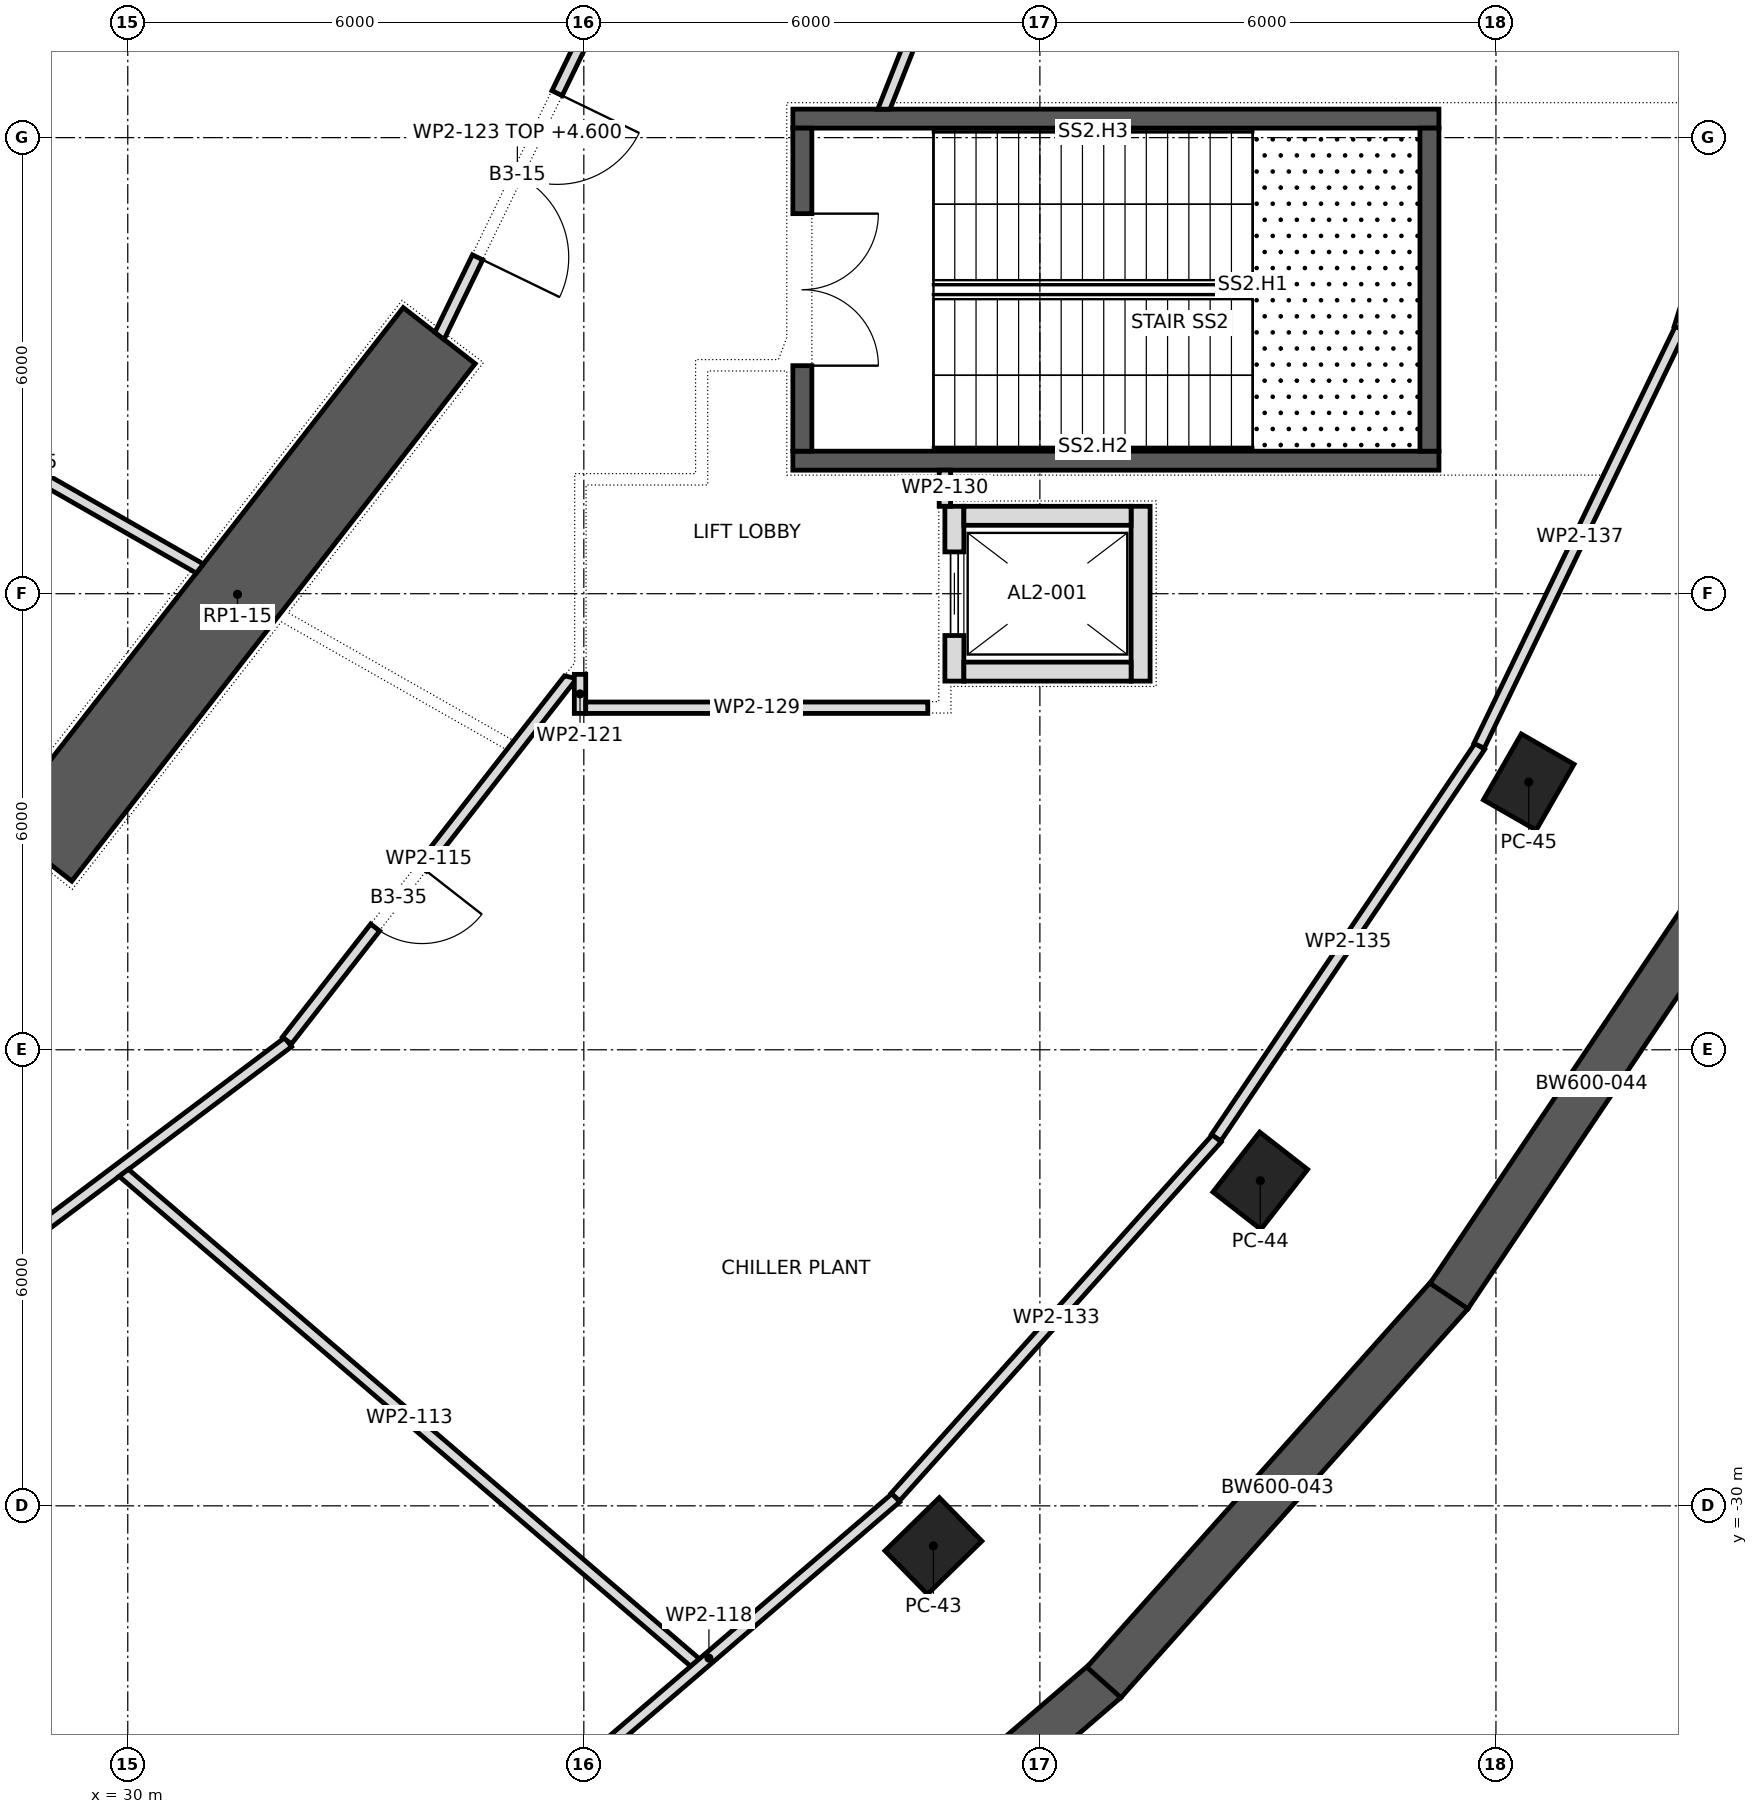
"""IFC4 building model, lengths in metres.
Left out: names, types, materials, properties, quantities, classifications, styles, units other than length and angle.
Written with IfcOpenShell. Run it as: python <this file> out.ifc"""

import sys

from ifc_helpers import new_model, si_unit, direction, frame, frame_2d, origin, origin_2d, place, context, subcontext, project, spatial, polyline, rectangle, outline, extrude, element, fill, save


model = new_model("IFC4")
c1 = context("Model", 3, precision=1e-05, world=origin(), true_north=direction((0.0, 1.0)))
c2 = subcontext(c1, "Body", "Model", "MODEL_VIEW")
j1 = project(units=[si_unit("LENGTHUNIT", "METRE"), si_unit("PLANEANGLEUNIT", "RADIAN")], contexts=[c1])
p1 = place(None, origin())
s1 = spatial("IfcSite", under=j1, at=p1, CompositionType="ELEMENT")
p2 = place(p1, origin())
s2 = spatial("IfcBuilding", under=s1, at=p2, CompositionType="ELEMENT")
p3 = place(p2, frame((0.0, 0.0, -15.0)))
s3 = spatial("IfcBuildingStorey", under=s2, at=p3, CompositionType="ELEMENT", Elevation=-15.0)
for number, where, z_axis, x_axis in (
    (1, (40.599, -30.528, -0.4), (0.0, 0.0, 1.0), (0.715, 0.699, 0.0)),
    (2, (44.899, -25.723, -0.4), (0.0, 0.0, 1.0), (0.615, 0.789, 0.0)),
    (3, (48.431, -20.478, -0.4), (0.0, 0.0, 1.0), (0.499, 0.867, 0.0)),
):
    element("IfcColumn", number, at=place(p3, frame(where, z_axis=z_axis, x_axis=x_axis)), inside=s3, PredefinedType="COLUMN", context=c2, shape_type="SweptSolid", body=[
        extrude(rectangle(XDim=1.0, YDim=0.8, at=origin_2d()), origin(), (0.0, 0.0, 1.0), 5.9),
    ])
p4 = place(p3, frame((28.79, -21.412, -0.4), z_axis=(0.0, 0.0, 1.0), x_axis=(0.614825322247, 0.788663314174, 0.0)))
e4 = element("IfcWall", 4, at=p4, inside=s3, PredefinedType="SHEAR", context=c2, shape_type="SweptSolid", body=[
    extrude(rectangle(XDim=8.632, YDim=1.2, at=frame_2d((4.316, 0.0))), origin(), (0.0, 0.0, 1.0), 5.9),
])
p5 = place(p3, frame((37.568, -36.853, -0.4), z_axis=(0.0, 0.0, 1.0), x_axis=(0.758319142722, 0.65188348482, 0.0)))
e5 = element("IfcWall", 5, at=p5, inside=s3, PredefinedType="SOLIDWALL", context=c2, shape_type="SweptSolid", body=[
    extrude(rectangle(XDim=6.991, YDim=0.6, at=frame_2d((3.496, 0.0))), origin(), (0.0, 0.0, 1.0), 5.9),
])
p6 = place(p3, frame((42.842, -32.323, -0.4), z_axis=(0.0, 0.0, 1.0), x_axis=(0.665894053378, 0.74604631872, 0.0)))
e6 = element("IfcWall", 6, at=p6, inside=s3, PredefinedType="SOLIDWALL", context=c2, shape_type="SweptSolid", body=[
    extrude(rectangle(XDim=6.856, YDim=0.6, at=frame_2d((3.428, 0.0))), origin(), (0.0, 0.0, 1.0), 5.9),
])
p7 = place(p3, frame((47.382, -27.24, -0.4), z_axis=(0.0, 0.0, 1.0), x_axis=(0.557518861869, 0.830164272093, 0.0)))
e7 = element("IfcWall", 7, at=p7, inside=s3, PredefinedType="SOLIDWALL", context=c2, shape_type="SweptSolid", body=[
    extrude(rectangle(XDim=6.729, YDim=0.6, at=frame_2d((3.364, 0.0))), origin(), (0.0, 0.0, 1.0), 5.9),
])
for number, where, z_axis, x_axis in (
    (8, (38.75, -11.75, 0.0), (0.0, 0.0, 1.0), (1.0, 0.0, 0.0)),
    (9, (38.75, -16.25, 0.0), (0.0, 0.0, 1.0), (1.0, 0.0, 0.0)),
):
    element("IfcWall", number, at=place(p3, frame(where, z_axis=z_axis, x_axis=x_axis)), inside=s3, PredefinedType="SHEAR", context=c2, shape_type="SweptSolid", body=[
        extrude(rectangle(XDim=8.5, YDim=0.25, at=frame_2d((4.25, 0.0))), origin(), (0.0, 0.0, 1.0), 5.15),
    ])
p8 = place(p3, frame((38.875, -16.125, 0.0), z_axis=(0.0, 0.0, 1.0), x_axis=(0.0, 1.0, 0.0)))
e10 = element("IfcWall", 10, at=p8, inside=s3, PredefinedType="SHEAR", context=c2, shape_type="SweptSolid", body=[
    extrude(rectangle(XDim=4.25, YDim=0.25, at=frame_2d((2.125, 0.0))), origin(), (0.0, 0.0, 1.0), 5.15),
])
p9 = place(p8, frame((1.125, 0.0, 0.0)))
e11 = element("IfcOpeningElement", 11, at=p9, cuts=e10, PredefinedType="OPENING", context=c2, shape_type="SweptSolid", body=[
    extrude(rectangle(XDim=2.0, YDim=2.1, at=frame_2d((1.0, 1.05))), frame((0.0, 0.137, 0.0), z_axis=(0.0, -1.0, 0.0), x_axis=(1.0, 0.0, 0.0)), (0.0, 0.0, 1.0), 0.274),
])
p10 = place(p3, frame((47.125, -16.125, 0.0), z_axis=(0.0, 0.0, 1.0), x_axis=(0.0, 1.0, 0.0)))
e12 = element("IfcWall", 12, at=p10, inside=s3, PredefinedType="SHEAR", context=c2, shape_type="SweptSolid", body=[
    extrude(rectangle(XDim=4.25, YDim=0.25, at=frame_2d((2.125, 0.0))), origin(), (0.0, 0.0, 1.0), 5.15),
])
p11 = place(p3, frame((40.875, -19.15, 0.0), z_axis=(0.0, 0.0, 1.0), x_axis=(0.0, 1.0, 0.0)))
e13 = element("IfcWall", 13, at=p11, inside=s3, PredefinedType="PARTITIONING", context=c2, shape_type="SweptSolid", body=[
    extrude(rectangle(XDim=2.3, YDim=0.25, at=frame_2d((1.15, 0.0))), origin(), (0.0, 0.0, 1.0), 5.15),
])
p12 = place(p11, frame((0.6, 0.0, 0.0)))
e14 = element("IfcOpeningElement", 14, at=p12, cuts=e13, PredefinedType="OPENING", context=c2, shape_type="SweptSolid", body=[
    extrude(rectangle(XDim=1.1, YDim=2.1, at=frame_2d((0.55, 1.05))), frame((0.0, 0.137, 0.0), z_axis=(0.0, -1.0, 0.0), x_axis=(1.0, 0.0, 0.0)), (0.0, 0.0, 1.0), 0.274),
])
p13 = place(p3, frame((43.325, -19.15, 0.0), z_axis=(0.0, 0.0, 1.0), x_axis=(0.0, 1.0, 0.0)))
e15 = element("IfcWall", 15, at=p13, inside=s3, PredefinedType="PARTITIONING", context=c2, shape_type="SweptSolid", body=[
    extrude(rectangle(XDim=2.3, YDim=0.25, at=frame_2d((1.15, 0.0))), origin(), (0.0, 0.0, 1.0), 5.15),
])
for number, where, z_axis, x_axis in (
    (16, (41.0, -16.975, 0.0), (0.0, 0.0, 1.0), (1.0, 0.0, 0.0)),
    (17, (41.0, -19.025, 0.0), (0.0, 0.0, 1.0), (1.0, 0.0, 0.0)),
):
    element("IfcWall", number, at=place(p3, frame(where, z_axis=z_axis, x_axis=x_axis)), inside=s3, PredefinedType="PARTITIONING", context=c2, shape_type="SweptSolid", body=[
        extrude(rectangle(XDim=2.2, YDim=0.25, at=frame_2d((1.1, 0.0))), origin(), (0.0, 0.0, 1.0), 5.15),
    ])
p14 = place(p3, frame((23.696, -30.228, 0.0), z_axis=(0.0, 0.0, 1.0), x_axis=(0.799195100787, 0.601071701944, 0.0)))
e18 = element("IfcWall", 18, at=p14, inside=s3, PredefinedType="PARTITIONING", context=c2, shape_type="SweptSolid", body=[
    extrude(rectangle(XDim=10.529, YDim=0.15, at=frame_2d((5.264, 0.0))), origin(), (0.0, 0.0, 1.0), 5.15),
])
p15 = place(p3, frame((26.074, -14.882, 0.0), z_axis=(0.0, 0.0, 1.0), x_axis=(0.868133416031, -0.496330909746, 0.0)))
e19 = element("IfcWall", 19, at=p15, inside=s3, PredefinedType="PARTITIONING", context=c2, shape_type="SweptSolid", body=[
    extrude(outline(polyline([(0.0, -0.075), (5.604, -0.075), (5.626, 0.075), (0.0, 0.075), (0.0, -0.075)])), origin(), (0.0, 0.0, 1.0), 5.15),
])
p16 = place(p3, frame((29.947, -25.619, 0.0), z_axis=(0.0, 0.0, 1.0), x_axis=(0.759265306208, -0.650781218836, 0.0)))
e20 = element("IfcWall", 20, at=p16, inside=s3, PredefinedType="PARTITIONING", context=c2, shape_type="SweptSolid", body=[
    extrude(outline(polyline([(-0.017, -0.075), (9.888, -0.075), (9.911, 0.075), (0.017, 0.075), (-0.017, -0.075)])), origin(), (0.0, 0.0, 1.0), 5.15),
])
p17 = place(p3, frame((32.094, -23.878, 0.0), z_axis=(0.0, 0.0, 1.0), x_axis=(0.615450256232, 0.788175730472, 0.0)))
e21 = element("IfcWall", 21, at=p17, inside=s3, PredefinedType="PARTITIONING", context=c2, shape_type="SweptSolid", body=[
    extrude(outline(polyline([(0.0, -0.075), (6.097, -0.075), (6.03, 0.075), (0.0, 0.075), (0.0, -0.075)])), origin(), (0.0, 0.0, 1.0), 5.15),
])
p18 = place(p17, frame((1.887, 0.0, 0.0)))
e22 = element("IfcOpeningElement", 22, at=p18, cuts=e21, PredefinedType="OPENING", context=c2, shape_type="SweptSolid", body=[
    extrude(rectangle(XDim=1.0, YDim=2.1, at=frame_2d((0.5, 1.05))), frame((0.0, 0.087, 0.0), z_axis=(0.0, -1.0, 0.0), x_axis=(1.0, 0.0, 0.0)), (0.0, 0.0, 1.0), 0.174),
])
p19 = place(p3, frame((35.185, -34.114, 0.0), z_axis=(0.0, 0.0, 1.0), x_axis=(0.759033312601, 0.651051787773, 0.0)))
e23 = element("IfcWall", 23, at=p19, inside=s3, PredefinedType="PARTITIONING", context=c2, shape_type="SweptSolid", body=[
    extrude(rectangle(XDim=6.484, YDim=0.15, at=frame_2d((3.242, 0.0))), origin(), (0.0, 0.0, 1.0), 5.15),
])
p20 = place(p3, frame((35.95, -19.575, 0.0), z_axis=(0.0, 0.0, 1.0), x_axis=(0.0, 1.0, 0.0)))
e24 = element("IfcWall", 24, at=p20, inside=s3, PredefinedType="PARTITIONING", context=c2, shape_type="SweptSolid", body=[
    extrude(rectangle(XDim=0.514, YDim=0.15, at=frame_2d((0.257, 0.0))), origin(), (0.0, 0.0, 1.0), 5.15),
])
p21 = place(p3, frame((36.15, -10.38, 0.0), z_axis=(0.0, 0.0, 1.0), x_axis=(-0.436102687495, -0.899896908518, 0.0)))
e25 = element("IfcWall", 25, at=p21, inside=s3, PredefinedType="PARTITIONING", context=c2, shape_type="SweptSolid", body=[
    extrude(outline(polyline([(0.017, -0.075), (4.683, -0.075), (4.715, 0.075), (-0.017, 0.075), (0.017, -0.075)])), origin(), (0.0, 0.0, 1.0), 4.6),
])
p22 = place(p21, frame((1.15, 0.0, 0.0)))
e26 = element("IfcOpeningElement", 26, at=p22, cuts=e25, PredefinedType="OPENING", context=c2, shape_type="SweptSolid", body=[
    extrude(rectangle(XDim=2.4, YDim=2.1, at=frame_2d((1.2, 1.05))), frame((0.0, 0.087, 0.0), z_axis=(0.0, -1.0, 0.0), x_axis=(1.0, 0.0, 0.0)), (0.0, 0.0, 1.0), 0.174),
])
p23 = place(p3, frame((39.948, -11.625, 0.0), z_axis=(0.0, 0.0, 1.0), x_axis=(0.368047556164, 0.92980696728, 0.0)))
e27 = element("IfcWall", 27, at=p23, inside=s3, PredefinedType="PARTITIONING", context=c2, shape_type="SweptSolid", body=[
    extrude(outline(polyline([(0.03, -0.075), (4.914, -0.075), (4.914, 0.075), (-0.03, 0.075), (0.03, -0.075)])), origin(), (0.0, 0.0, 1.0), 5.15),
])
p24 = place(p3, frame((40.525, -19.5, 0.0), z_axis=(0.0, 0.0, 1.0), x_axis=(-1.0, 0.0, 0.0)))
e28 = element("IfcWall", 28, at=p24, inside=s3, PredefinedType="PARTITIONING", context=c2, shape_type="SweptSolid", body=[
    extrude(rectangle(XDim=4.5, YDim=0.15, at=frame_2d((2.25, 0.0))), origin(), (0.0, 0.0, 1.0), 5.15),
])
p25 = place(p3, frame((40.75, -16.374, 0.0), z_axis=(0.0, 0.0, 1.0), x_axis=(0.0, -1.0, 0.0)))
e29 = element("IfcWall", 29, at=p25, inside=s3, PredefinedType="PARTITIONING", context=c2, shape_type="SweptSolid", body=[
    extrude(rectangle(XDim=0.476, YDim=0.15, at=frame_2d((0.238, 0.0))), origin(), (0.0, 0.0, 1.0), 5.15),
])
p26 = place(p3, frame((44.329, -25.165, 0.0), z_axis=(0.0, 0.0, 1.0), x_axis=(-0.6673947824, -0.744704105283, 0.0)))
e30 = element("IfcWall", 30, at=p26, inside=s3, PredefinedType="PARTITIONING", context=c2, shape_type="SweptSolid", body=[
    extrude(rectangle(XDim=6.338, YDim=0.15, at=frame_2d((3.169, 0.0))), origin(), (0.0, 0.0, 1.0), 5.15),
])
p27 = place(p3, frame((47.789, -20.007, 0.0), z_axis=(0.0, 0.0, 1.0), x_axis=(-0.558812320082, -0.829294152231, 0.0)))
e31 = element("IfcWall", 31, at=p27, inside=s3, PredefinedType="PARTITIONING", context=c2, shape_type="SweptSolid", body=[
    extrude(rectangle(XDim=6.21, YDim=0.15, at=frame_2d((3.105, 0.0))), origin(), (0.0, 0.0, 1.0), 5.15),
])
p28 = place(p3, frame((50.428, -14.511, 0.0), z_axis=(0.0, 0.0, 1.0), x_axis=(-0.434690826011, -0.900579749818, 0.0)))
e32 = element("IfcWall", 32, at=p28, inside=s3, PredefinedType="PARTITIONING", context=c2, shape_type="SweptSolid", body=[
    extrude(rectangle(XDim=6.096, YDim=0.15, at=frame_2d((3.048, 0.0))), origin(), (0.0, 0.0, 1.0), 5.15),
])
p29 = place(p3, frame((50.416, -14.506, 0.0), z_axis=(0.0, 0.0, 1.0), x_axis=(0.297713123711, 0.954655380737, 0.0)))
e33 = element("IfcWall", 33, at=p29, inside=s3, PredefinedType="PARTITIONING", context=c2, shape_type="SweptSolid", body=[
    extrude(rectangle(XDim=6.013, YDim=0.15, at=frame_2d((3.006, 0.0))), origin(), (0.0, 0.0, 1.0), 5.15),
])
p30 = place(p12, origin())
e34 = element("IfcDoor", 34, at=p30, inside=s3, OperationType="SLIDING_TO_LEFT", PredefinedType="DOOR", context=c2, shape_type="SweptSolid", body=[
    extrude(rectangle(XDim=1.1, YDim=2.1, at=frame_2d((0.55, 1.05))), frame((0.0, 0.025, 0.0), z_axis=(0.0, -1.0, 0.0), x_axis=(1.0, 0.0, 0.0)), (0.0, 0.0, 1.0), 0.05),
])
fill(e14, e34)
p31 = place(p9, frame((2.0, 0.0, 0.0), z_axis=(0.0, 0.0, 1.0), x_axis=(-1.0, 0.0, 0.0)))
e35 = element("IfcDoor", 35, at=p31, inside=s3, OperationType="DOUBLE_DOOR_SINGLE_SWING", PredefinedType="DOOR", context=c2, shape_type="SweptSolid", body=[
    extrude(rectangle(XDim=2.0, YDim=2.1, at=frame_2d((1.0, 1.05))), frame((0.0, 0.025, 0.0), z_axis=(0.0, -1.0, 0.0), x_axis=(1.0, 0.0, 0.0)), (0.0, 0.0, 1.0), 0.05),
])
fill(e11, e35)
p32 = place(p22, origin())
e36 = element("IfcDoor", 36, at=p32, inside=s3, OperationType="DOUBLE_DOOR_SINGLE_SWING", PredefinedType="DOOR", context=c2, shape_type="SweptSolid", body=[
    extrude(rectangle(XDim=2.4, YDim=2.1, at=frame_2d((1.2, 1.05))), frame((0.0, 0.025, 0.0), z_axis=(0.0, -1.0, 0.0), x_axis=(1.0, 0.0, 0.0)), (0.0, 0.0, 1.0), 0.05),
])
fill(e26, e36)
p33 = place(p18, frame((1.0, 0.0, 0.0), z_axis=(0.0, 0.0, 1.0), x_axis=(-1.0, 0.0, 0.0)))
e37 = element("IfcDoor", 37, at=p33, inside=s3, OperationType="SINGLE_SWING_RIGHT", PredefinedType="DOOR", context=c2, shape_type="SweptSolid", body=[
    extrude(rectangle(XDim=1.0, YDim=2.1, at=frame_2d((0.5, 1.05))), frame((0.0, 0.025, 0.0), z_axis=(0.0, -1.0, 0.0), x_axis=(1.0, 0.0, 0.0)), (0.0, 0.0, 1.0), 0.05),
])
fill(e22, e37)
save(model, sys.argv[1])
